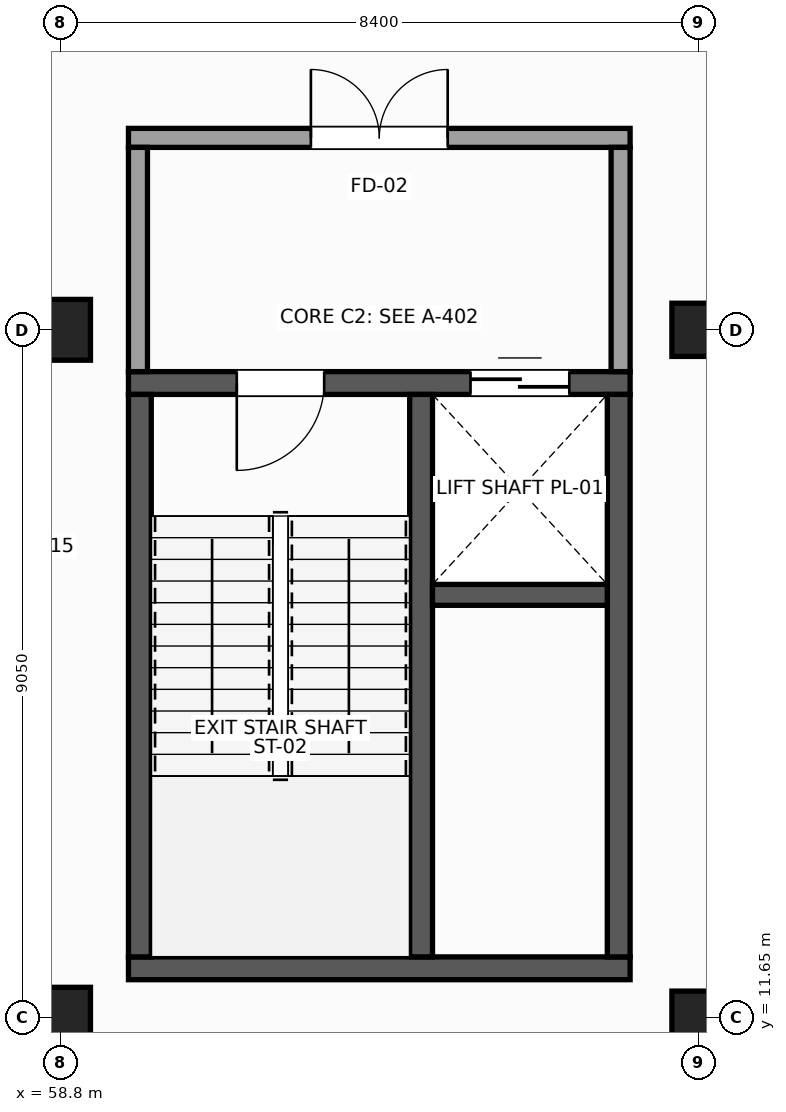
"""IFC4 building model, lengths in metres.
Left out: names, types, materials, properties, quantities, classifications, styles, units other than length and angle.
Written with IfcOpenShell. Run it as: python <this file> out.ifc"""

import sys

from ifc_helpers import new_model, si_unit, direction, frame, frame_2d, origin, origin_2d, place, context, subcontext, project, spatial, rectangle, extrude, element, fill, save


model = new_model("IFC4")
c1 = context("Model", 3, precision=1e-05, world=origin(), true_north=direction((0.0, 1.0)))
c2 = subcontext(c1, "Body", "Model", "MODEL_VIEW")
j1 = project(units=[si_unit("LENGTHUNIT", "METRE"), si_unit("PLANEANGLEUNIT", "RADIAN")], contexts=[c1])
p1 = place(None, origin())
s1 = spatial("IfcSite", under=j1, at=p1, CompositionType="ELEMENT")
p2 = place(p1, origin())
s2 = spatial("IfcBuilding", under=s1, at=p2, CompositionType="ELEMENT")
p3 = place(p2, frame((0.0, 0.0, 10.8)))
s3 = spatial("IfcBuildingStorey", under=s2, at=p3, CompositionType="ELEMENT", Elevation=10.8)
for number, where, z_axis, x_axis in (
    (1, (58.8, 11.65, 0.0), (0.0, 0.0, 1.0), (1.0, 0.0, 0.0)),
    (2, (58.8, 20.7, 0.0), (0.0, 0.0, 1.0), (1.0, 0.0, 0.0)),
):
    element("IfcColumn", number, at=place(p3, frame(where, z_axis=z_axis, x_axis=x_axis)), inside=s3, PredefinedType="COLUMN", context=c2, shape_type="SweptSolid", body=[
        extrude(rectangle(XDim=0.8, YDim=0.8, at=origin_2d()), origin(), (0.0, 0.0, 1.0), 4.8),
    ])
for number, where, z_axis, x_axis in (
    (3, (67.2, 11.65, 0.0), (0.0, 0.0, 1.0), (1.0, 0.0, 0.0)),
    (4, (67.2, 20.7, 0.0), (0.0, 0.0, 1.0), (1.0, 0.0, 0.0)),
):
    element("IfcColumn", number, at=place(p3, frame(where, z_axis=z_axis, x_axis=x_axis)), inside=s3, PredefinedType="COLUMN", context=c2, shape_type="SweptSolid", body=[
        extrude(rectangle(XDim=0.7, YDim=0.7, at=origin_2d()), origin(), (0.0, 0.0, 1.0), 4.8),
    ])
p4 = place(p3, frame((59.7, 12.3, 0.0), z_axis=(0.0, 0.0, 1.0), x_axis=(1.0, 0.0, 0.0)))
e5 = element("IfcWall", 5, at=p4, inside=s3, PredefinedType="SHEAR", context=c2, shape_type="SweptSolid", body=[
    extrude(rectangle(XDim=6.6, YDim=0.3, at=frame_2d((3.3, 0.0))), origin(), (0.0, 0.0, 1.0), 4.5),
])
p5 = place(p3, frame((59.7, 20.0, 0.0), z_axis=(0.0, 0.0, 1.0), x_axis=(1.0, 0.0, 0.0)))
e6 = element("IfcWall", 6, at=p5, inside=s3, PredefinedType="SHEAR", context=c2, shape_type="SweptSolid", body=[
    extrude(rectangle(XDim=6.6, YDim=0.3, at=frame_2d((3.3, 0.0))), origin(), (0.0, 0.0, 1.0), 4.5),
])
p6 = place(p5, frame((1.425, 0.0, 0.0)))
e7 = element("IfcOpeningElement", 7, at=p6, cuts=e6, PredefinedType="OPENING", context=c2, shape_type="SweptSolid", body=[
    extrude(rectangle(XDim=1.15, YDim=2.2, at=frame_2d((0.575, 1.1))), frame((0.0, 0.16, 0.0), z_axis=(0.0, -1.0, 0.0), x_axis=(1.0, 0.0, 0.0)), (0.0, 0.0, 1.0), 0.32),
])
p7 = place(p5, frame((4.5, 0.0, 0.0)))
e8 = element("IfcOpeningElement", 8, at=p7, cuts=e6, PredefinedType="OPENING", context=c2, shape_type="SweptSolid", body=[
    extrude(rectangle(XDim=1.3, YDim=2.2, at=frame_2d((0.65, 1.1))), frame((0.0, 0.16, 0.0), z_axis=(0.0, -1.0, 0.0), x_axis=(1.0, 0.0, 0.0)), (0.0, 0.0, 1.0), 0.32),
])
for number, where, z_axis, x_axis in (
    (9, (59.85, 12.45, 0.0), (0.0, 0.0, 1.0), (0.0, 1.0, 0.0)),
    (10, (66.15, 12.45, 0.0), (0.0, 0.0, 1.0), (0.0, 1.0, 0.0)),
    (11, (63.55, 12.45, 0.0), (0.0, 0.0, 1.0), (0.0, 1.0, 0.0)),
):
    element("IfcWall", number, at=place(p3, frame(where, z_axis=z_axis, x_axis=x_axis)), inside=s3, PredefinedType="SHEAR", context=c2, shape_type="SweptSolid", body=[
        extrude(rectangle(XDim=7.4, YDim=0.3, at=frame_2d((3.7, 0.0))), origin(), (0.0, 0.0, 1.0), 4.5),
    ])
p8 = place(p3, frame((63.7, 17.213, 0.0), z_axis=(0.0, 0.0, 1.0), x_axis=(1.0, 0.0, 0.0)))
e12 = element("IfcWall", 12, at=p8, inside=s3, PredefinedType="SHEAR", context=c2, shape_type="SweptSolid", body=[
    extrude(rectangle(XDim=2.3, YDim=0.275, at=frame_2d((1.15, 0.0))), origin(), (0.0, 0.0, 1.0), 4.5),
])
p9 = place(p3, frame((59.7, 23.225, 0.0), z_axis=(0.0, 0.0, 1.0), x_axis=(1.0, 0.0, 0.0)))
e13 = element("IfcWall", 13, at=p9, inside=s3, PredefinedType="PARTITIONING", context=c2, shape_type="SweptSolid", body=[
    extrude(rectangle(XDim=6.6, YDim=0.25, at=frame_2d((3.3, 0.0))), origin(), (0.0, 0.0, 1.0), 4.5),
])
p10 = place(p9, frame((2.4, 0.0, 0.0)))
e14 = element("IfcOpeningElement", 14, at=p10, cuts=e13, PredefinedType="OPENING", context=c2, shape_type="SweptSolid", body=[
    extrude(rectangle(XDim=1.8, YDim=2.25, at=frame_2d((0.9, 1.125))), frame((0.0, 0.135, 0.0), z_axis=(0.0, -1.0, 0.0), x_axis=(1.0, 0.0, 0.0)), (0.0, 0.0, 1.0), 0.27),
])
for number, where, z_axis, x_axis in (
    (15, (59.825, 20.15, 0.0), (0.0, 0.0, 1.0), (0.0, 1.0, 0.0)),
    (16, (66.175, 20.15, 0.0), (0.0, 0.0, 1.0), (0.0, 1.0, 0.0)),
):
    element("IfcWall", number, at=place(p3, frame(where, z_axis=z_axis, x_axis=x_axis)), inside=s3, PredefinedType="PARTITIONING", context=c2, shape_type="SweptSolid", body=[
        extrude(rectangle(XDim=2.95, YDim=0.25, at=frame_2d((1.475, 0.0))), origin(), (0.0, 0.0, 1.0), 3.73),
    ])
p11 = place(p6, frame((1.15, 0.0, 0.0), z_axis=(0.0, 0.0, 1.0), x_axis=(-1.0, 0.0, 0.0)))
e17 = element("IfcDoor", 17, at=p11, inside=s3, OperationType="SINGLE_SWING_RIGHT", PredefinedType="DOOR", context=c2, shape_type="SweptSolid", body=[
    extrude(rectangle(XDim=1.15, YDim=2.2, at=frame_2d((0.575, 1.1))), frame((0.0, 0.025, 0.0), z_axis=(0.0, -1.0, 0.0), x_axis=(1.0, 0.0, 0.0)), (0.0, 0.0, 1.0), 0.05),
])
fill(e7, e17)
p12 = place(p7, origin())
e18 = element("IfcDoor", 18, at=p12, inside=s3, OperationType="DOUBLE_DOOR_SLIDING", PredefinedType="DOOR", context=c2, shape_type="SweptSolid", body=[
    extrude(rectangle(XDim=1.3, YDim=2.2, at=frame_2d((0.65, 1.1))), frame((0.0, 0.025, 0.0), z_axis=(0.0, -1.0, 0.0), x_axis=(1.0, 0.0, 0.0)), (0.0, 0.0, 1.0), 0.05),
])
fill(e8, e18)
p13 = place(p10, origin())
e19 = element("IfcDoor", 19, at=p13, inside=s3, OperationType="DOUBLE_DOOR_SINGLE_SWING", PredefinedType="DOOR", context=c2, shape_type="SweptSolid", body=[
    extrude(rectangle(XDim=1.8, YDim=2.25, at=frame_2d((0.9, 1.125))), frame((0.0, 0.025, 0.0), z_axis=(0.0, -1.0, 0.0), x_axis=(1.0, 0.0, 0.0)), (0.0, 0.0, 1.0), 0.05),
])
fill(e14, e19)
save(model, sys.argv[1])
